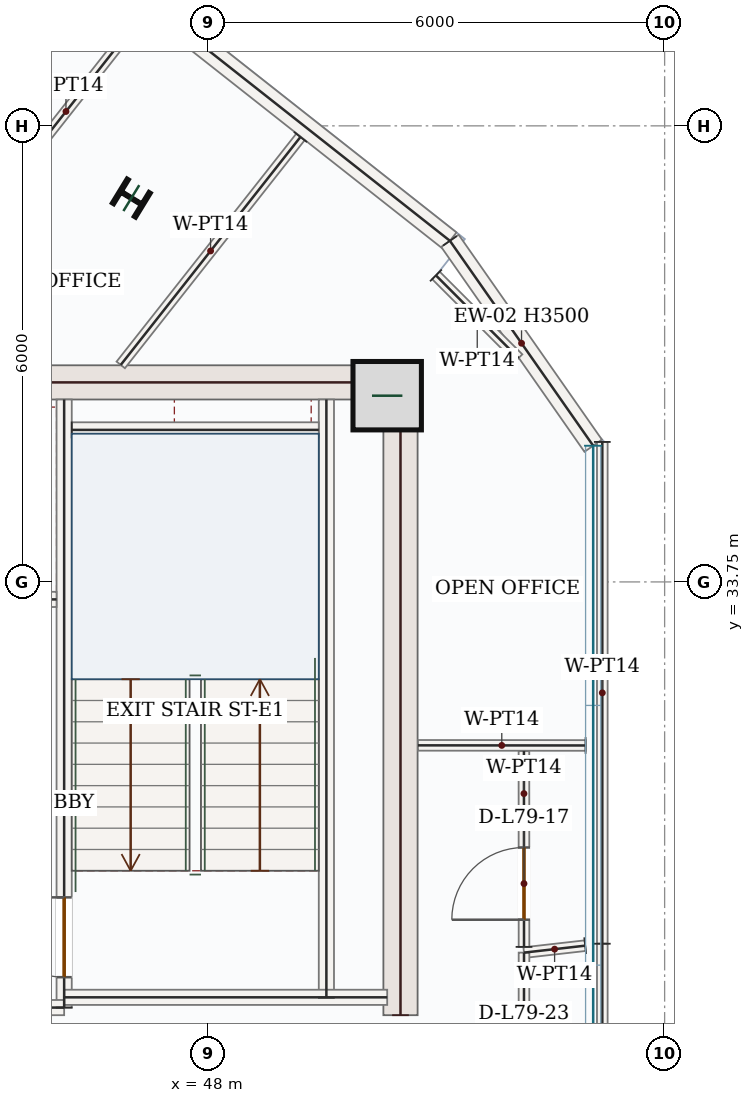
"""IFC4 building model, lengths in metres.
Left out: names, types, materials, properties, quantities, classifications, styles, units other than length and angle.
Written with IfcOpenShell. Run it as: python <this file> out.ifc"""

import sys

from ifc_helpers import new_model, si_unit, direction, frame, frame_2d, origin, origin_2d, place, context, subcontext, project, spatial, rectangle, i_section, extrude, source, transform, mapped, element, fill, save


model = new_model("IFC4")
c1 = context("Model", 3, precision=1e-05, world=origin(), true_north=direction((0.0, 1.0)))
c2 = subcontext(c1, "Body", "Model", "MODEL_VIEW")
j1 = project(units=[si_unit("LENGTHUNIT", "METRE"), si_unit("PLANEANGLEUNIT", "RADIAN")], contexts=[c1])
p1 = place(None, origin())
s1 = spatial("IfcSite", under=j1, at=p1, CompositionType="ELEMENT")
p2 = place(p1, origin())
s2 = spatial("IfcBuilding", under=s1, at=p2, CompositionType="ELEMENT")
p3 = place(p2, frame((0.0, 0.0, 327.3)))
s3 = spatial("IfcBuildingStorey", under=s2, at=p3, CompositionType="ELEMENT", Elevation=327.3)
m1 = source(origin(), c2, "Body", "SweptSolid", [
    extrude(rectangle(XDim=8.55, YDim=0.45, at=frame_2d((4.275, 0.0))), origin(), (0.0, 0.0, 1.0), 3.5),
])
p4 = place(p3, frame((50.525, 28.05, 0.0), z_axis=(0.0, 0.0, 1.0), x_axis=(0.0, 1.0, 0.0)))
e1 = element("IfcWall", 1, at=p4, inside=s3, PredefinedType="SHEAR", context=c2, shape_type="MappedRepresentation", body=[
    mapped(m1, transform((0.0, 0.0, 0.0), x_axis=(1.0, 0.0, 0.0), y_axis=(0.0, 1.0, 0.0), z_axis=(0.0, 0.0, 1.0), scale=1.0)),
])
m2 = source(origin(), c2, "Body", "SweptSolid", [
    extrude(rectangle(XDim=7.1, YDim=0.45, at=frame_2d((3.55, 0.0))), origin(), (0.0, 0.0, 1.0), 3.5),
])
p5 = place(p3, frame((43.2, 36.375, 0.0), z_axis=(0.0, 0.0, 1.0), x_axis=(1.0, 0.0, 0.0)))
e2 = element("IfcWall", 2, at=p5, inside=s3, PredefinedType="SHEAR", context=c2, shape_type="MappedRepresentation", body=[
    mapped(m2, transform((0.0, 0.0, 0.0), x_axis=(1.0, 0.0, 0.0), y_axis=(0.0, 1.0, 0.0), z_axis=(0.0, 0.0, 1.0), scale=1.0)),
])
m3 = source(origin(), c2, "Body", "SweptSolid", [
    extrude(rectangle(XDim=0.9, YDim=0.9, at=origin_2d()), origin(), (0.0, 0.0, 1.0), 3.75),
])
p6 = place(p3, frame((50.35, 36.2, 0.0), z_axis=(0.0, 0.0, 1.0), x_axis=(1.0, 0.0, 0.0)))
e3 = element("IfcColumn", 3, at=p6, inside=s3, PredefinedType="COLUMN", context=c2, shape_type="MappedRepresentation", body=[
    mapped(m3, transform((0.0, 0.0, 0.0), x_axis=(1.0, 0.0, 0.0), y_axis=(0.0, 1.0, 0.0), z_axis=(0.0, 0.0, 1.0), scale=1.0)),
])
m4 = source(origin(), c2, "Body", "SweptSolid", [
    extrude(i_section(OverallWidth=0.369, OverallDepth=0.356, WebThickness=0.011, FlangeThickness=0.018, FilletRadius=0.018, at=origin_2d()), origin(), (0.0, 0.0, 1.0), 3.75),
])
p7 = place(p3, frame((46.984, 38.8, 0.0), z_axis=(0.0, 0.0, 1.0), x_axis=(0.522498564716, 0.852640164354, 0.0)))
e4 = element("IfcColumn", 4, at=p7, inside=s3, PredefinedType="COLUMN", context=c2, shape_type="MappedRepresentation", body=[
    mapped(m4, transform((0.0, 0.0, 0.0), x_axis=(1.0, 0.0, 0.0), y_axis=(0.0, 1.0, 0.0), z_axis=(0.0, 0.0, 1.0), scale=1.0)),
])
m5 = source(origin(), c2, "Body", "SweptSolid", [
    extrude(rectangle(XDim=9.92, YDim=0.28, at=frame_2d((4.96, 0.0))), origin(), (0.0, 0.0, 1.0), 3.5),
])
p8 = place(p3, frame((43.385, 44.379, 0.0), z_axis=(0.0, 0.0, 1.0), x_axis=(0.785317257435, -0.619093535077, 0.0)))
e5 = element("IfcWall", 5, at=p8, inside=s3, PredefinedType="SOLIDWALL", context=c2, shape_type="MappedRepresentation", body=[
    mapped(m5, transform((0.0, 0.0, 0.0), x_axis=(1.0, 0.0, 0.0), y_axis=(0.0, 1.0, 0.0), z_axis=(0.0, 0.0, 1.0), scale=1.0)),
])
m6 = source(origin(), c2, "Body", "SweptSolid", [
    extrude(rectangle(XDim=3.29, YDim=0.28, at=frame_2d((1.645, 0.0))), origin(), (0.0, 0.0, 1.0), 3.5),
])
p9 = place(p3, frame((51.175, 38.238, 0.0), z_axis=(0.0, 0.0, 1.0), x_axis=(0.573043854491, -0.819524704222, 0.0)))
e6 = element("IfcWall", 6, at=p9, inside=s3, PredefinedType="SOLIDWALL", context=c2, shape_type="MappedRepresentation", body=[
    mapped(m6, transform((0.0, 0.0, 0.0), x_axis=(1.0, 0.0, 0.0), y_axis=(0.0, 1.0, 0.0), z_axis=(0.0, 0.0, 1.0), scale=1.0)),
])
m7 = source(origin(), c2, "Body", "SweptSolid", [
    extrude(rectangle(XDim=7.87, YDim=0.2, at=frame_2d((3.935, 0.0))), origin(), (0.0, 0.0, 1.0), 3.5),
])
p10 = place(p3, frame((49.55, 28.28, 0.0), z_axis=(0.0, 0.0, 1.0), x_axis=(0.0, 1.0, 0.0)))
e7 = element("IfcWall", 7, at=p10, inside=s3, PredefinedType="SOLIDWALL", context=c2, shape_type="MappedRepresentation", body=[
    mapped(m7, transform((0.0, 0.0, 0.0), x_axis=(1.0, 0.0, 0.0), y_axis=(0.0, 1.0, 0.0), z_axis=(0.0, 0.0, 1.0), scale=1.0)),
])
p11 = place(p3, frame((46.1, 28.15, 0.0), z_axis=(0.0, 0.0, 1.0), x_axis=(0.0, 1.0, 0.0)))
e8 = element("IfcWall", 8, at=p11, inside=s3, PredefinedType="SOLIDWALL", context=c2, shape_type="SweptSolid", body=[
    extrude(rectangle(XDim=8.0, YDim=0.2, at=frame_2d((4.0, 0.0))), origin(), (0.0, 0.0, 1.0), 3.5),
])
p12 = place(p11, frame((0.4, 0.0, 0.0)))
e9 = element("IfcOpeningElement", 9, at=p12, cuts=e8, PredefinedType="OPENING", context=c2, shape_type="SweptSolid", body=[
    extrude(rectangle(XDim=1.05, YDim=2.15, at=frame_2d((0.525, 1.075))), frame((0.0, 0.11, 0.0), z_axis=(0.0, -1.0, 0.0), x_axis=(1.0, 0.0, 0.0)), (0.0, 0.0, 1.0), 0.22),
])
m8 = source(origin(), c2, "Body", "SweptSolid", [
    extrude(rectangle(XDim=3.0, YDim=0.2, at=frame_2d((1.5, 0.0))), origin(), (0.0, 0.0, 1.0), 3.5),
])
p13 = place(p3, frame((43.1, 28.15, 0.0), z_axis=(0.0, 0.0, 1.0), x_axis=(1.0, 0.0, 0.0)))
e10 = element("IfcWall", 10, at=p13, inside=s3, PredefinedType="SOLIDWALL", context=c2, shape_type="MappedRepresentation", body=[
    mapped(m8, transform((0.0, 0.0, 0.0), x_axis=(1.0, 0.0, 0.0), y_axis=(0.0, 1.0, 0.0), z_axis=(0.0, 0.0, 1.0), scale=1.0)),
])
m9 = source(origin(), c2, "Body", "SweptSolid", [
    extrude(rectangle(XDim=4.25, YDim=0.2, at=frame_2d((2.125, 0.0))), origin(), (0.0, 0.0, 1.0), 3.5),
])
p14 = place(p3, frame((46.1, 28.285, 0.0), z_axis=(0.0, 0.0, 1.0), x_axis=(1.0, 0.0, 0.0)))
e11 = element("IfcWall", 11, at=p14, inside=s3, PredefinedType="SOLIDWALL", context=c2, shape_type="MappedRepresentation", body=[
    mapped(m9, transform((0.0, 0.0, 0.0), x_axis=(1.0, 0.0, 0.0), y_axis=(0.0, 1.0, 0.0), z_axis=(0.0, 0.0, 1.0), scale=1.0)),
])
m10 = source(origin(), c2, "Body", "SweptSolid", [
    extrude(rectangle(XDim=3.25, YDim=0.2, at=frame_2d((1.625, 0.0))), origin(), (0.0, 0.0, 1.0), 3.5),
])
p15 = place(p3, frame((46.2, 35.75, 0.0), z_axis=(0.0, 0.0, 1.0), x_axis=(1.0, 0.0, 0.0)))
e12 = element("IfcWall", 12, at=p15, inside=s3, PredefinedType="SOLIDWALL", context=c2, shape_type="MappedRepresentation", body=[
    mapped(m10, transform((0.0, 0.0, 0.0), x_axis=(1.0, 0.0, 0.0), y_axis=(0.0, 1.0, 0.0), z_axis=(0.0, 0.0, 1.0), scale=1.0)),
])
p16 = place(p3, frame((43.25, 33.52, 0.0), z_axis=(0.0, 0.0, 1.0), x_axis=(1.0, 0.0, 0.0)))
e13 = element("IfcWall", 13, at=p16, inside=s3, PredefinedType="SOLIDWALL", context=c2, shape_type="SweptSolid", body=[
    extrude(rectangle(XDim=2.75, YDim=0.2, at=frame_2d((1.375, 0.0))), origin(), (0.0, 0.0, 1.0), 3.5),
])
p17 = place(p16, frame((0.82, 0.0, 0.0)))
e14 = element("IfcOpeningElement", 14, at=p17, cuts=e13, PredefinedType="OPENING", context=c2, shape_type="SweptSolid", body=[
    extrude(rectangle(XDim=1.1, YDim=2.15, at=frame_2d((0.55, 1.075))), frame((0.0, 0.11, 0.0), z_axis=(0.0, -1.0, 0.0), x_axis=(1.0, 0.0, 0.0)), (0.0, 0.0, 1.0), 0.22),
])
m11 = source(origin(), c2, "Body", "SweptSolid", [
    extrude(rectangle(XDim=3.818, YDim=0.14, at=frame_2d((1.909, 0.0))), origin(), (0.0, 0.0, 1.0), 3.5),
])
p18 = place(p3, frame((49.208, 39.604, 0.0), z_axis=(0.0, 0.0, 1.0), x_axis=(-0.619119655452, -0.78529666511, 0.0)))
e15 = element("IfcWall", 15, at=p18, inside=s3, PredefinedType="PARTITIONING", context=c2, shape_type="MappedRepresentation", body=[
    mapped(m11, transform((0.0, 0.0, 0.0), x_axis=(1.0, 0.0, 0.0), y_axis=(0.0, 1.0, 0.0), z_axis=(0.0, 0.0, 1.0), scale=1.0)),
])
p19 = place(p3, frame((43.823, 37.02, 0.0), z_axis=(0.0, 0.0, 1.0), x_axis=(0.619105408422, 0.785307897109, 0.0)))
e16 = element("IfcWall", 16, at=p19, inside=s3, PredefinedType="PARTITIONING", context=c2, shape_type="SweptSolid", body=[
    extrude(rectangle(XDim=5.363, YDim=0.14, at=frame_2d((2.682, 0.0))), origin(), (0.0, 0.0, 1.0), 3.5),
])
p20 = place(p19, frame((0.971, 0.0, 0.0)))
e17 = element("IfcOpeningElement", 17, at=p20, cuts=e16, PredefinedType="OPENING", context=c2, shape_type="SweptSolid", body=[
    extrude(rectangle(XDim=0.95, YDim=2.15, at=frame_2d((0.475, 1.075))), frame((0.0, 0.08, 0.0), z_axis=(0.0, -1.0, 0.0), x_axis=(1.0, 0.0, 0.0)), (0.0, 0.0, 1.0), 0.16),
])
m12 = source(origin(), c2, "Body", "SweptSolid", [
    extrude(rectangle(XDim=2.205, YDim=0.14, at=frame_2d((1.103, 0.0))), origin(), (0.0, 0.0, 1.0), 3.5),
])
p21 = place(p3, frame((52.96, 31.598, 0.0), z_axis=(0.0, 0.0, 1.0), x_axis=(-0.99999969967, 0.000775021911, 0.0)))
e18 = element("IfcWall", 18, at=p21, inside=s3, PredefinedType="PARTITIONING", context=c2, shape_type="MappedRepresentation", body=[
    mapped(m12, transform((0.0, 0.0, 0.0), x_axis=(1.0, 0.0, 0.0), y_axis=(0.0, 1.0, 0.0), z_axis=(0.0, 0.0, 1.0), scale=1.0)),
])
m13 = source(origin(), c2, "Body", "SweptSolid", [
    extrude(rectangle(XDim=1.538, YDim=0.14, at=frame_2d((0.769, 0.0))), origin(), (0.0, 0.0, 1.0), 3.5),
])
p22 = place(p3, frame((50.991, 37.783, 0.0), z_axis=(0.0, 0.0, 1.0), x_axis=(0.706709909315, -0.707503430434, 0.0)))
e19 = element("IfcWall", 19, at=p22, inside=s3, PredefinedType="PARTITIONING", context=c2, shape_type="MappedRepresentation", body=[
    mapped(m13, transform((0.0, 0.0, 0.0), x_axis=(1.0, 0.0, 0.0), y_axis=(0.0, 1.0, 0.0), z_axis=(0.0, 0.0, 1.0), scale=1.0)),
])
m14 = source(origin(), c2, "Body", "SweptSolid", [
    extrude(rectangle(XDim=6.602, YDim=0.14, at=frame_2d((3.301, 0.0))), origin(), (0.0, 0.0, 1.0), 3.5),
])
p23 = place(p3, frame((53.18, 35.592, 0.0), z_axis=(0.0, 0.0, 1.0), x_axis=(0.0, -1.0, 0.0)))
e20 = element("IfcWall", 20, at=p23, inside=s3, PredefinedType="PARTITIONING", context=c2, shape_type="MappedRepresentation", body=[
    mapped(m14, transform((0.0, 0.0, 0.0), x_axis=(1.0, 0.0, 0.0), y_axis=(0.0, 1.0, 0.0), z_axis=(0.0, 0.0, 1.0), scale=1.0)),
])
m15 = source(origin(), c2, "Body", "SweptSolid", [
    extrude(rectangle(XDim=0.81, YDim=0.14, at=frame_2d((0.405, 0.0))), origin(), (0.0, 0.0, 1.0), 3.5),
])
p24 = place(p3, frame((52.955, 28.965, 0.0), z_axis=(0.0, 0.0, 1.0), x_axis=(-0.99359757088, -0.112977285955, 0.0)))
e21 = element("IfcWall", 21, at=p24, inside=s3, PredefinedType="PARTITIONING", context=c2, shape_type="MappedRepresentation", body=[
    mapped(m15, transform((0.0, 0.0, 0.0), x_axis=(1.0, 0.0, 0.0), y_axis=(0.0, 1.0, 0.0), z_axis=(0.0, 0.0, 1.0), scale=1.0)),
])
p25 = place(p3, frame((52.15, 28.948, 0.0), z_axis=(0.0, 0.0, 1.0), x_axis=(-0.000379182834, 0.99999992811, 0.0)))
e22 = element("IfcWall", 22, at=p25, inside=s3, PredefinedType="PARTITIONING", context=c2, shape_type="SweptSolid", body=[
    extrude(rectangle(XDim=2.575, YDim=0.14, at=frame_2d((1.288, 0.0))), origin(), (0.0, 0.0, 1.0), 3.5),
])
p26 = place(p25, frame((0.358, 0.0, 0.0)))
e23 = element("IfcOpeningElement", 23, at=p26, cuts=e22, PredefinedType="OPENING", context=c2, shape_type="SweptSolid", body=[
    extrude(rectangle(XDim=0.95, YDim=2.15, at=frame_2d((0.475, 1.075))), frame((0.0, 0.08, 0.0), z_axis=(0.0, -1.0, 0.0), x_axis=(1.0, 0.0, 0.0)), (0.0, 0.0, 1.0), 0.16),
])
p27 = place(p3, frame((52.147, 22.477, 0.0), z_axis=(0.0, 0.0, 1.0), x_axis=(0.0003817085, 0.999999927149, 0.0)))
e24 = element("IfcWall", 24, at=p27, inside=s3, PredefinedType="PARTITIONING", context=c2, shape_type="SweptSolid", body=[
    extrude(rectangle(XDim=6.396, YDim=0.14, at=frame_2d((3.198, 0.0))), origin(), (0.0, 0.0, 1.0), 3.5),
])
p28 = place(p27, frame((4.248, 0.0, 0.0)))
e25 = element("IfcOpeningElement", 25, at=p28, cuts=e24, PredefinedType="OPENING", context=c2, shape_type="SweptSolid", body=[
    extrude(rectangle(XDim=0.95, YDim=2.15, at=frame_2d((0.475, 1.075))), frame((0.0, 0.08, 0.0), z_axis=(0.0, -1.0, 0.0), x_axis=(1.0, 0.0, 0.0)), (0.0, 0.0, 1.0), 0.16),
])
m16 = source(origin(), c2, "Body", "SweptSolid", [
    extrude(rectangle(XDim=6.881, YDim=0.14, at=frame_2d((3.441, 0.0))), origin(), (0.0, 0.0, 1.0), 3.5),
])
p29 = place(p3, frame((53.18, 28.99, 0.0), z_axis=(0.0, 0.0, 1.0), x_axis=(0.0, -1.0, 0.0)))
e26 = element("IfcWall", 26, at=p29, inside=s3, PredefinedType="PARTITIONING", context=c2, shape_type="MappedRepresentation", body=[
    mapped(m16, transform((0.0, 0.0, 0.0), x_axis=(1.0, 0.0, 0.0), y_axis=(0.0, 1.0, 0.0), z_axis=(0.0, 0.0, 1.0), scale=1.0)),
])
m17 = source(origin(), c2, "Body", "SweptSolid", [
    extrude(rectangle(XDim=1.05, YDim=2.15, at=frame_2d((0.525, 1.075))), frame((0.0, 0.025, 0.0), z_axis=(0.0, -1.0, 0.0), x_axis=(1.0, 0.0, 0.0)), (0.0, 0.0, 1.0), 0.05),
])
p30 = place(p12, origin())
e27 = element("IfcDoor", 27, at=p30, inside=s3, OperationType="SINGLE_SWING_RIGHT", PredefinedType="DOOR", context=c2, shape_type="MappedRepresentation", body=[
    mapped(m17, transform((0.0, 0.0, 0.0), x_axis=(1.0, 0.0, 0.0), y_axis=(0.0, 1.0, 0.0), z_axis=(0.0, 0.0, 1.0), scale=1.0)),
])
fill(e9, e27)
m18 = source(origin(), c2, "Body", "SweptSolid", [
    extrude(rectangle(XDim=0.95, YDim=2.15, at=frame_2d((0.475, 1.075))), frame((0.0, 0.025, 0.0), z_axis=(0.0, -1.0, 0.0), x_axis=(1.0, 0.0, 0.0)), (0.0, 0.0, 1.0), 0.05),
])
p31 = place(p26, origin())
e28 = element("IfcDoor", 28, at=p31, inside=s3, OperationType="SINGLE_SWING_LEFT", PredefinedType="DOOR", context=c2, shape_type="MappedRepresentation", body=[
    mapped(m18, transform((0.0, 0.0, 0.0), x_axis=(1.0, 0.0, 0.0), y_axis=(0.0, 1.0, 0.0), z_axis=(0.0, 0.0, 1.0), scale=1.0)),
])
fill(e23, e28)
save(model, sys.argv[1])
